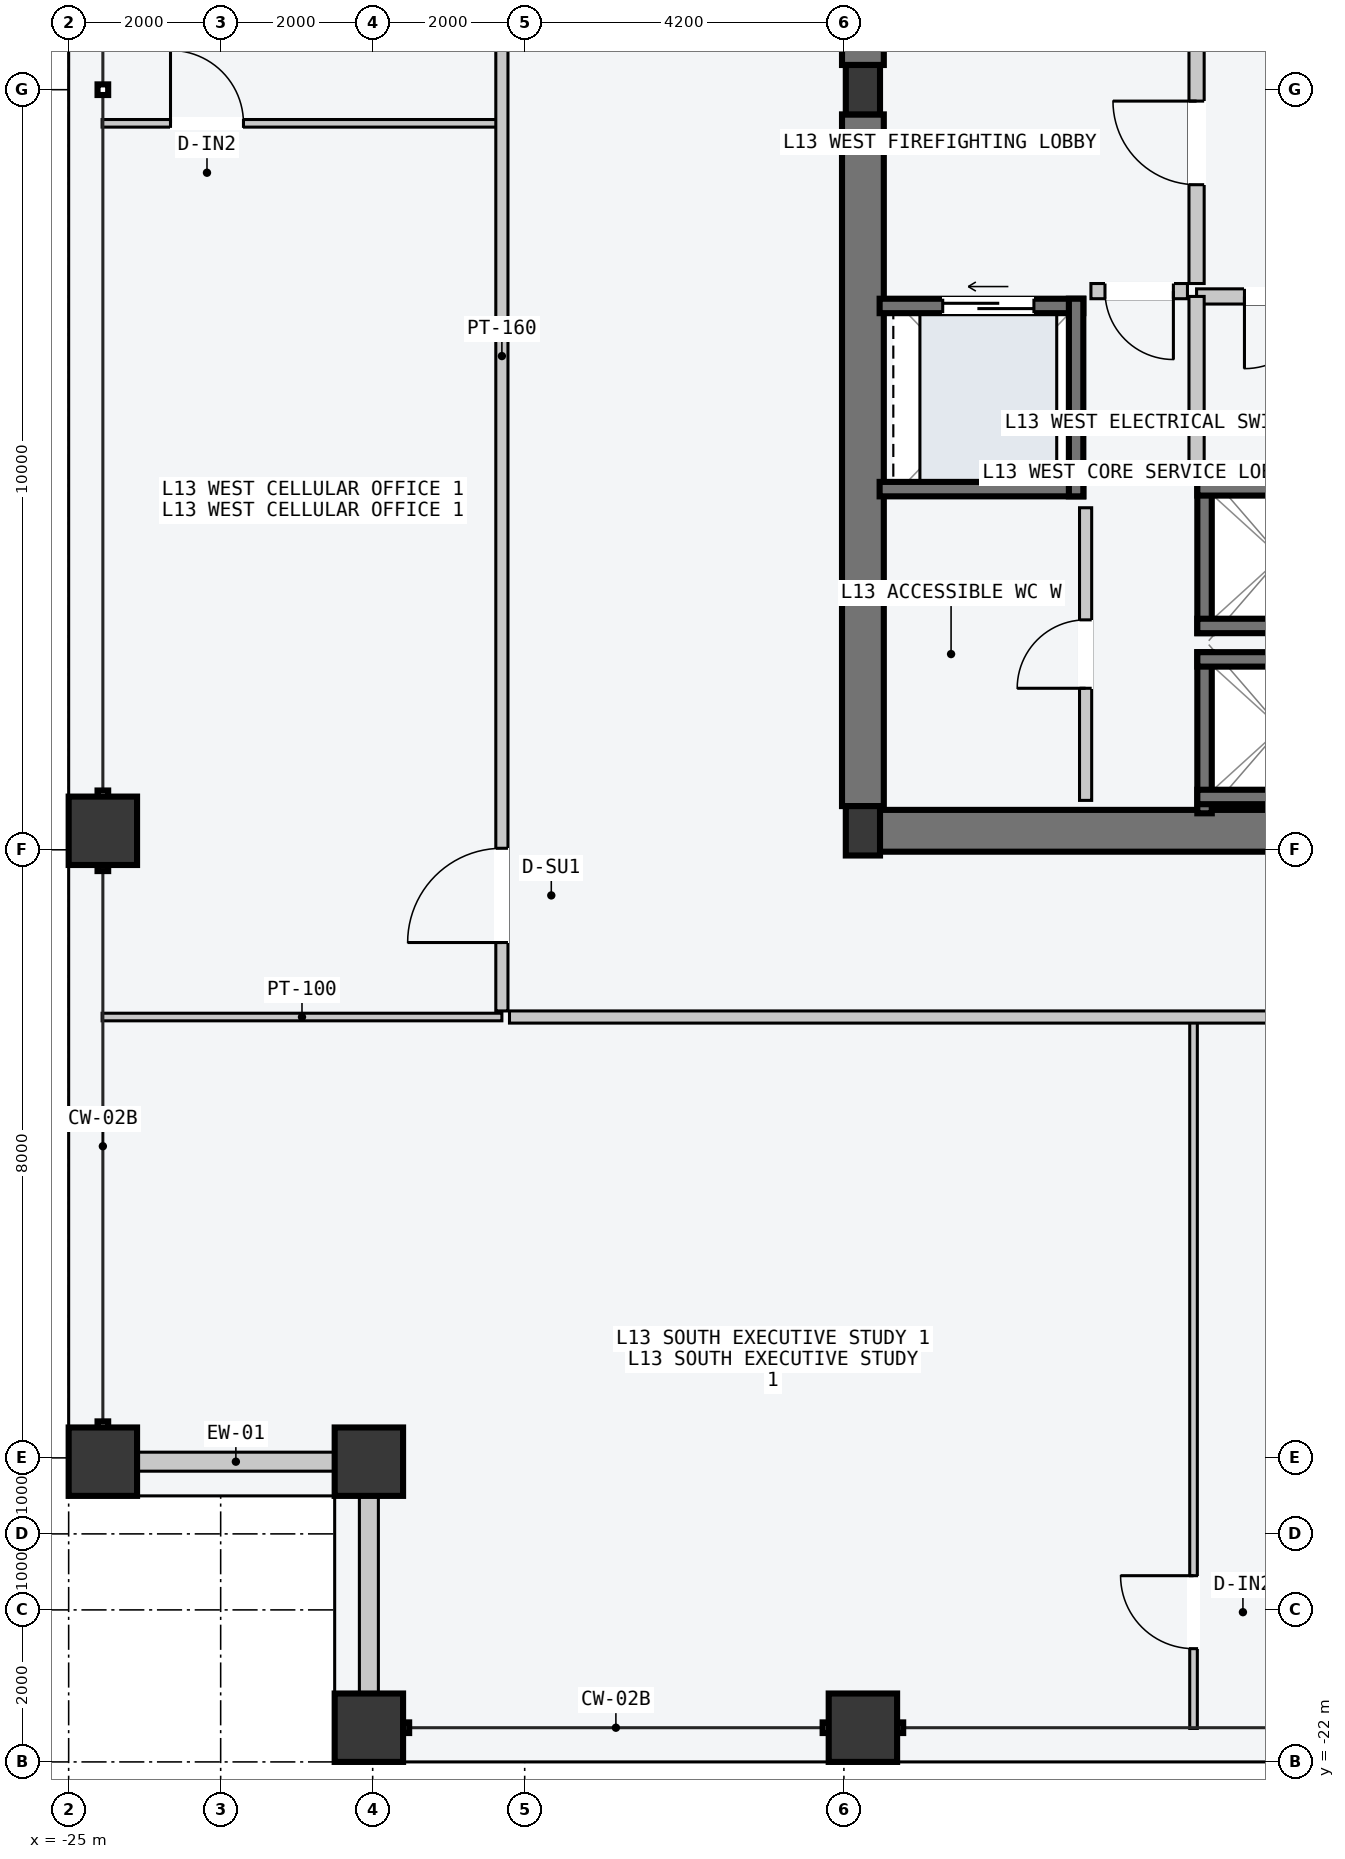
"""IFC4 building model, lengths in metres.
Left out: names, types, materials, properties, quantities, classifications, styles, units other than length and angle.
Written with IfcOpenShell. Run it as: python <this file> out.ifc"""

import sys

from ifc_helpers import new_model, si_unit, direction, frame, frame_2d, origin, origin_2d, place, context, subcontext, project, spatial, rectangle, hollow_rectangle, i_section, extrude, element, fill, save


model = new_model("IFC4")
c1 = context("Model", 3, precision=1e-05, world=origin(), true_north=direction((0.0, 1.0)))
c2 = subcontext(c1, "Body", "Model", "MODEL_VIEW")
j1 = project(units=[si_unit("LENGTHUNIT", "METRE"), si_unit("PLANEANGLEUNIT", "RADIAN")], contexts=[c1])
p1 = place(None, origin())
s1 = spatial("IfcSite", under=j1, at=p1, CompositionType="ELEMENT")
p2 = place(p1, origin())
s2 = spatial("IfcBuilding", under=s1, at=p2, CompositionType="ELEMENT")
p3 = place(p2, frame((0.0, 0.0, 52.8)))
s3 = spatial("IfcBuildingStorey", under=s2, at=p3, CompositionType="ELEMENT", Elevation=52.8)
p4 = place(p3, frame((-14.53, -9.75, -0.2), z_axis=(0.0, 0.0, 1.0), x_axis=(1.0, 0.0, 0.0)))
e1 = element("IfcWall", 1, at=p4, inside=s3, PredefinedType="SHEAR", context=c2, shape_type="SweptSolid", body=[
    extrude(rectangle(XDim=6.46, YDim=0.55, at=frame_2d((3.23, 0.0))), origin(), (0.0, 0.0, 1.0), 3.6),
])
for number, where, z_axis, x_axis in (
    (2, (-14.55, -9.425, -0.2), (0.0, 0.0, 1.0), (0.0, 1.0, 0.0)),
    (3, (-14.55, 0.325, -0.2), (0.0, 0.0, 1.0), (0.0, 1.0, 0.0)),
):
    element("IfcWall", number, at=place(p3, frame(where, z_axis=z_axis, x_axis=x_axis)), inside=s3, PredefinedType="SHEAR", context=c2, shape_type="SweptSolid", body=[
        extrude(rectangle(XDim=9.1, YDim=0.55, at=frame_2d((4.55, 0.0))), origin(), (0.0, 0.0, 1.0), 3.6),
    ])
for number, where, z_axis, x_axis in (
    (4, (-14.55, -9.75, 0.0), (0.0, 0.0, 1.0), (1.0, 0.0, 0.0)),
    (5, (-14.55, 0.0, 0.0), (0.0, 0.0, 1.0), (1.0, 0.0, 0.0)),
):
    element("IfcColumn", number, at=place(p3, frame(where, z_axis=z_axis, x_axis=x_axis)), inside=s3, PredefinedType="COLUMN", context=c2, shape_type="SweptSolid", body=[
        extrude(i_section(OverallWidth=0.45, OverallDepth=0.65, WebThickness=0.025, FlangeThickness=0.04, at=origin_2d()), origin(), (0.0, 0.0, 1.0), 3.6),
    ])
for number, where, z_axis, x_axis in (
    (6, (-21.05, -21.55, 0.0), (0.0, 0.0, 1.0), (1.0, 0.0, 0.0)),
    (7, (-14.55, -21.55, 0.0), (0.0, 0.0, 1.0), (1.0, 0.0, 0.0)),
    (8, (-24.55, -18.05, 0.0), (0.0, 0.0, 1.0), (0.0, 1.0, 0.0)),
    (9, (-24.55, -9.75, 0.0), (0.0, 0.0, 1.0), (0.0, 1.0, 0.0)),
    (10, (-21.05, -18.05, 0.0), (0.0, 0.0, 1.0), (1.0, 0.0, 0.0)),
):
    element("IfcColumn", number, at=place(p3, frame(where, z_axis=z_axis, x_axis=x_axis)), inside=s3, PredefinedType="COLUMN", context=c2, shape_type="SweptSolid", body=[
        extrude(hollow_rectangle(XDim=0.9, YDim=0.9, WallThickness=0.045, at=origin_2d()), origin(), (0.0, 0.0, 1.0), 3.6),
    ])
for number, where, z_axis, x_axis in (
    (11, (-24.09, -18.05, 0.0), (0.0, 0.0, 1.0), (1.0, 0.0, 0.0)),
    (12, (-21.05, -21.09, 0.0), (0.0, 0.0, 1.0), (0.0, 1.0, 0.0)),
):
    element("IfcWall", number, at=place(p3, frame(where, z_axis=z_axis, x_axis=x_axis)), inside=s3, PredefinedType="STANDARD", context=c2, shape_type="SweptSolid", body=[
        extrude(rectangle(XDim=2.58, YDim=0.25, at=frame_2d((1.29, 0.0))), origin(), (0.0, 0.0, 1.0), 1.74),
    ])
p5 = place(p3, frame((-10.055, -9.52, -0.2), z_axis=(0.0, 0.0, 1.0), x_axis=(0.0, 1.0, 0.0)))
e13 = element("IfcWall", 13, at=p5, inside=s3, PredefinedType="SOLIDWALL", context=c2, shape_type="SweptSolid", body=[
    extrude(rectangle(XDim=2.12, YDim=0.19, at=frame_2d((1.06, 0.0))), origin(), (0.0, 0.0, 1.0), 3.6),
])
for number, where, z_axis, x_axis in (
    (14, (-10.15, -7.495, -0.2), (0.0, 0.0, 1.0), (1.0, 0.0, 0.0)),
    (15, (-10.15, -9.305, -0.2), (0.0, 0.0, 1.0), (1.0, 0.0, 0.0)),
):
    element("IfcWall", number, at=place(p3, frame(where, z_axis=z_axis, x_axis=x_axis)), inside=s3, PredefinedType="SOLIDWALL", context=c2, shape_type="SweptSolid", body=[
        extrude(rectangle(XDim=2.2, YDim=0.19, at=frame_2d((1.1, 0.0))), origin(), (0.0, 0.0, 1.0), 3.6),
    ])
p6 = place(p3, frame((-10.055, -7.15, -0.2), z_axis=(0.0, 0.0, 1.0), x_axis=(0.0, 1.0, 0.0)))
e16 = element("IfcWall", 16, at=p6, inside=s3, PredefinedType="SOLIDWALL", context=c2, shape_type="SweptSolid", body=[
    extrude(rectangle(XDim=2.0, YDim=0.19, at=frame_2d((1.0, 0.0))), origin(), (0.0, 0.0, 1.0), 3.6),
])
for number, where, z_axis, x_axis in (
    (17, (-10.15, -5.245, -0.2), (0.0, 0.0, 1.0), (1.0, 0.0, 0.0)),
    (18, (-10.15, -7.055, -0.2), (0.0, 0.0, 1.0), (1.0, 0.0, 0.0)),
):
    element("IfcWall", number, at=place(p3, frame(where, z_axis=z_axis, x_axis=x_axis)), inside=s3, PredefinedType="SOLIDWALL", context=c2, shape_type="SweptSolid", body=[
        extrude(rectangle(XDim=2.2, YDim=0.19, at=frame_2d((1.1, 0.0))), origin(), (0.0, 0.0, 1.0), 3.6),
    ])
p7 = place(p3, frame((-14.33, -2.845, -0.2), z_axis=(0.0, 0.0, 1.0), x_axis=(1.0, 0.0, 0.0)))
e19 = element("IfcWall", 19, at=p7, inside=s3, PredefinedType="SOLIDWALL", context=c2, shape_type="SweptSolid", body=[
    extrude(rectangle(XDim=2.68, YDim=0.19, at=frame_2d((1.34, 0.0))), origin(), (0.0, 0.0, 1.0), 3.6),
])
p8 = place(p7, frame((0.83, 0.0, 0.2)))
e20 = element("IfcOpeningElement", 20, at=p8, cuts=e19, PredefinedType="OPENING", context=c2, shape_type="SweptSolid", body=[
    extrude(rectangle(XDim=1.2, YDim=2.2, at=frame_2d((0.6, 1.1))), frame((0.0, 0.105, 0.0), z_axis=(0.0, -1.0, 0.0), x_axis=(1.0, 0.0, 0.0)), (0.0, 0.0, 1.0), 0.21),
])
p9 = place(p3, frame((-14.33, -5.255, -0.2), z_axis=(0.0, 0.0, 1.0), x_axis=(1.0, 0.0, 0.0)))
e21 = element("IfcWall", 21, at=p9, inside=s3, PredefinedType="SOLIDWALL", context=c2, shape_type="SweptSolid", body=[
    extrude(rectangle(XDim=2.68, YDim=0.19, at=frame_2d((1.34, 0.0))), origin(), (0.0, 0.0, 1.0), 3.6),
])
p10 = place(p3, frame((-11.745, -5.35, -0.2), z_axis=(0.0, 0.0, 1.0), x_axis=(0.0, 1.0, 0.0)))
e22 = element("IfcWall", 22, at=p10, inside=s3, PredefinedType="SOLIDWALL", context=c2, shape_type="SweptSolid", body=[
    extrude(rectangle(XDim=2.6, YDim=0.19, at=frame_2d((1.3, 0.0))), origin(), (0.0, 0.0, 1.0), 3.6),
])
p11 = place(p3, frame((-10.16, -2.55, 0.0), z_axis=(0.0, 0.0, 1.0), x_axis=(0.0, 1.0, 0.0)))
e23 = element("IfcWall", 23, at=p11, inside=s3, PredefinedType="PARTITIONING", context=c2, shape_type="SweptSolid", body=[
    extrude(rectangle(XDim=3.4, YDim=0.2, at=frame_2d((1.7, 0.0))), origin(), (0.0, 0.0, 1.0), 3.4),
])
p12 = place(p11, frame((1.3, 0.0, 0.0)))
e24 = element("IfcOpeningElement", 24, at=p12, cuts=e23, PredefinedType="OPENING", context=c2, shape_type="SweptSolid", body=[
    extrude(rectangle(XDim=1.1, YDim=2.15, at=frame_2d((0.55, 1.075))), frame((0.0, 0.11, 0.0), z_axis=(0.0, -1.0, 0.0), x_axis=(1.0, 0.0, 0.0)), (0.0, 0.0, 1.0), 0.22),
])
p13 = place(p3, frame((-10.28, -2.65, 0.0), z_axis=(0.0, 0.0, 1.0), x_axis=(-1.0, 0.0, 0.0)))
e25 = element("IfcWall", 25, at=p13, inside=s3, PredefinedType="PARTITIONING", context=c2, shape_type="SweptSolid", body=[
    extrude(rectangle(XDim=1.27, YDim=0.2, at=frame_2d((0.635, 0.0))), origin(), (0.0, 0.0, 1.0), 3.4),
])
p14 = place(p13, frame((0.185, 0.0, 0.0)))
e26 = element("IfcOpeningElement", 26, at=p14, cuts=e25, PredefinedType="OPENING", context=c2, shape_type="SweptSolid", body=[
    extrude(rectangle(XDim=0.9, YDim=2.15, at=frame_2d((0.45, 1.075))), frame((0.0, 0.11, 0.0), z_axis=(0.0, -1.0, 0.0), x_axis=(1.0, 0.0, 0.0)), (0.0, 0.0, 1.0), 0.22),
])
p15 = place(p3, frame((-7.96, -2.72, 0.0), z_axis=(0.0, 0.0, 1.0), x_axis=(-1.0, 0.0, 0.0)))
e27 = element("IfcWall", 27, at=p15, inside=s3, PredefinedType="PARTITIONING", context=c2, shape_type="SweptSolid", body=[
    extrude(rectangle(XDim=2.2, YDim=0.2, at=frame_2d((1.1, 0.0))), origin(), (0.0, 0.0, 1.0), 3.4),
])
p16 = place(p15, frame((0.62, 0.0, 0.0)))
e28 = element("IfcOpeningElement", 28, at=p16, cuts=e27, PredefinedType="OPENING", context=c2, shape_type="SweptSolid", body=[
    extrude(rectangle(XDim=0.95, YDim=2.1, at=frame_2d((0.475, 1.05))), frame((0.0, 0.11, 0.0), z_axis=(0.0, -1.0, 0.0), x_axis=(1.0, 0.0, 0.0)), (0.0, 0.0, 1.0), 0.22),
])
p17 = place(p3, frame((-10.16, -5.16, 0.0), z_axis=(0.0, 0.0, 1.0), x_axis=(0.0, 1.0, 0.0)))
e29 = element("IfcWall", 29, at=p17, inside=s3, PredefinedType="PARTITIONING", context=c2, shape_type="SweptSolid", body=[
    extrude(rectangle(XDim=2.44, YDim=0.2, at=frame_2d((1.22, 0.0))), origin(), (0.0, 0.0, 1.0), 3.4),
])
p18 = place(p3, frame((-11.62, -9.35, 0.0), z_axis=(0.0, 0.0, 1.0), x_axis=(0.0, 1.0, 0.0)))
e30 = element("IfcWall", 30, at=p18, inside=s3, PredefinedType="PARTITIONING", context=c2, shape_type="SweptSolid", body=[
    extrude(rectangle(XDim=3.85, YDim=0.16, at=frame_2d((1.925, 0.0))), origin(), (0.0, 0.0, 1.0), 3.4),
])
p19 = place(p18, frame((1.475, 0.0, 0.0)))
e31 = element("IfcOpeningElement", 31, at=p19, cuts=e30, PredefinedType="OPENING", context=c2, shape_type="SweptSolid", body=[
    extrude(rectangle(XDim=0.9, YDim=2.15, at=frame_2d((0.45, 1.075))), frame((0.0, 0.09, 0.0), z_axis=(0.0, -1.0, 0.0), x_axis=(1.0, 0.0, 0.0)), (0.0, 0.0, 1.0), 0.18),
])
p20 = place(p3, frame((-10.2, -21.56, 0.0), z_axis=(0.0, 0.0, 1.0), x_axis=(0.0, 1.0, 0.0)))
e32 = element("IfcWall", 32, at=p20, inside=s3, PredefinedType="PARTITIONING", context=c2, shape_type="SweptSolid", body=[
    extrude(rectangle(XDim=9.3, YDim=0.1, at=frame_2d((4.65, 0.0))), origin(), (0.0, 0.0, 1.0), 3.4),
])
p21 = place(p20, frame((1.05, 0.0, 0.0)))
e33 = element("IfcOpeningElement", 33, at=p21, cuts=e32, PredefinedType="OPENING", context=c2, shape_type="SweptSolid", body=[
    extrude(rectangle(XDim=0.96, YDim=2.18, at=frame_2d((0.48, 1.09))), frame((0.0, 0.06, 0.0), z_axis=(0.0, -1.0, 0.0), x_axis=(1.0, 0.0, 0.0)), (0.0, 0.0, 1.0), 0.12),
])
p22 = place(p3, frame((-19.2, -12.2, 0.0), z_axis=(0.0, 0.0, 1.0), x_axis=(1.0, 0.0, 0.0)))
e34 = element("IfcWall", 34, at=p22, inside=s3, PredefinedType="PARTITIONING", context=c2, shape_type="SweptSolid", body=[
    extrude(rectangle(XDim=38.4, YDim=0.16, at=frame_2d((19.2, 0.0))), origin(), (0.0, 0.0, 1.0), 1.74),
])
p23 = place(p3, frame((-24.56, -12.2, 0.0), z_axis=(0.0, 0.0, 1.0), x_axis=(1.0, 0.0, 0.0)))
e35 = element("IfcWall", 35, at=p23, inside=s3, PredefinedType="PARTITIONING", context=c2, shape_type="SweptSolid", body=[
    extrude(rectangle(XDim=5.26, YDim=0.1, at=frame_2d((2.63, 0.0))), origin(), (0.0, 0.0, 1.0), 1.74),
])
p24 = place(p3, frame((-24.56, -0.442, 0.0), z_axis=(0.0, 0.0, 1.0), x_axis=(1.0, 0.0, 0.0)))
e36 = element("IfcWall", 36, at=p24, inside=s3, PredefinedType="PARTITIONING", context=c2, shape_type="SweptSolid", body=[
    extrude(rectangle(XDim=5.2, YDim=0.1, at=frame_2d((2.6, 0.0))), origin(), (0.0, 0.0, 1.0), 3.4),
])
p25 = place(p24, frame((0.9, 0.0, 0.0)))
e37 = element("IfcOpeningElement", 37, at=p25, cuts=e36, PredefinedType="OPENING", context=c2, shape_type="SweptSolid", body=[
    extrude(rectangle(XDim=0.96, YDim=2.18, at=frame_2d((0.48, 1.09))), frame((0.0, 0.06, 0.0), z_axis=(0.0, -1.0, 0.0), x_axis=(1.0, 0.0, 0.0)), (0.0, 0.0, 1.0), 0.12),
])
p26 = place(p3, frame((-19.3, -12.12, 0.0), z_axis=(0.0, 0.0, 1.0), x_axis=(0.0, 1.0, 0.0)))
e38 = element("IfcWall", 38, at=p26, inside=s3, PredefinedType="PARTITIONING", context=c2, shape_type="SweptSolid", body=[
    extrude(rectangle(XDim=26.54, YDim=0.16, at=frame_2d((13.27, 0.0))), origin(), (0.0, 0.0, 1.0), 3.4),
])
p27 = place(p26, frame((0.9, 0.0, 0.0)))
e39 = element("IfcOpeningElement", 39, at=p27, cuts=e38, PredefinedType="OPENING", context=c2, shape_type="SweptSolid", body=[
    extrude(rectangle(XDim=1.24, YDim=2.24, at=frame_2d((0.62, 1.12))), frame((0.0, 0.09, 0.0), z_axis=(0.0, -1.0, 0.0), x_axis=(1.0, 0.0, 0.0)), (0.0, 0.0, 1.0), 0.18),
])
p28 = place(p26, frame((15.091, 0.0, 0.0)))
e40 = element("IfcOpeningElement", 40, at=p28, cuts=e38, PredefinedType="OPENING", context=c2, shape_type="SweptSolid", body=[
    extrude(rectangle(XDim=1.4, YDim=2.2, at=frame_2d((0.7, 1.1))), frame((0.0, 0.09, 0.0), z_axis=(0.0, -1.0, 0.0), x_axis=(1.0, 0.0, 0.0)), (0.0, 0.0, 1.0), 0.18),
])
p29 = place(p26, frame((22.772, 0.0, 0.0)))
e41 = element("IfcOpeningElement", 41, at=p29, cuts=e38, PredefinedType="OPENING", context=c2, shape_type="SweptSolid", body=[
    extrude(rectangle(XDim=0.9, YDim=2.15, at=frame_2d((0.45, 1.075))), frame((0.0, 0.09, 0.0), z_axis=(0.0, -1.0, 0.0), x_axis=(1.0, 0.0, 0.0)), (0.0, 0.0, 1.0), 0.18),
])
p30 = place(p8, origin())
e42 = element("IfcDoor", 42, at=p30, inside=s3, OperationType="SLIDING_TO_LEFT", PredefinedType="DOOR", context=c2, shape_type="SweptSolid", body=[
    extrude(rectangle(XDim=1.2, YDim=2.2, at=frame_2d((0.6, 1.1))), frame((0.0, 0.025, 0.0), z_axis=(0.0, -1.0, 0.0), x_axis=(1.0, 0.0, 0.0)), (0.0, 0.0, 1.0), 0.05),
])
fill(e20, e42)
p31 = place(p12, origin())
e43 = element("IfcDoor", 43, at=p31, inside=s3, OperationType="SINGLE_SWING_RIGHT", PredefinedType="DOOR", context=c2, shape_type="SweptSolid", body=[
    extrude(rectangle(XDim=1.1, YDim=2.15, at=frame_2d((0.55, 1.075))), frame((0.0, 0.025, 0.0), z_axis=(0.0, -1.0, 0.0), x_axis=(1.0, 0.0, 0.0)), (0.0, 0.0, 1.0), 0.05),
])
fill(e24, e43)
p32 = place(p14, origin())
e44 = element("IfcDoor", 44, at=p32, inside=s3, OperationType="SINGLE_SWING_LEFT", PredefinedType="DOOR", context=c2, shape_type="SweptSolid", body=[
    extrude(rectangle(XDim=0.9, YDim=2.15, at=frame_2d((0.45, 1.075))), frame((0.0, 0.025, 0.0), z_axis=(0.0, -1.0, 0.0), x_axis=(1.0, 0.0, 0.0)), (0.0, 0.0, 1.0), 0.05),
])
fill(e26, e44)
p33 = place(p16, origin())
e45 = element("IfcDoor", 45, at=p33, inside=s3, OperationType="SINGLE_SWING_RIGHT", PredefinedType="DOOR", context=c2, shape_type="SweptSolid", body=[
    extrude(rectangle(XDim=0.95, YDim=2.1, at=frame_2d((0.475, 1.05))), frame((0.0, 0.025, 0.0), z_axis=(0.0, -1.0, 0.0), x_axis=(1.0, 0.0, 0.0)), (0.0, 0.0, 1.0), 0.05),
])
fill(e28, e45)
p34 = place(p19, origin())
e46 = element("IfcDoor", 46, at=p34, inside=s3, OperationType="SINGLE_SWING_LEFT", PredefinedType="DOOR", context=c2, shape_type="SweptSolid", body=[
    extrude(rectangle(XDim=0.9, YDim=2.15, at=frame_2d((0.45, 1.075))), frame((0.0, 0.025, 0.0), z_axis=(0.0, -1.0, 0.0), x_axis=(1.0, 0.0, 0.0)), (0.0, 0.0, 1.0), 0.05),
])
fill(e31, e46)
p35 = place(p21, origin())
e47 = element("IfcDoor", 47, at=p35, inside=s3, OperationType="SINGLE_SWING_RIGHT", PredefinedType="DOOR", context=c2, shape_type="SweptSolid", body=[
    extrude(rectangle(XDim=0.96, YDim=2.18, at=frame_2d((0.48, 1.09))), frame((0.0, 0.025, 0.0), z_axis=(0.0, -1.0, 0.0), x_axis=(1.0, 0.0, 0.0)), (0.0, 0.0, 1.0), 0.05),
])
fill(e33, e47)
p36 = place(p25, origin())
e48 = element("IfcDoor", 48, at=p36, inside=s3, OperationType="SINGLE_SWING_LEFT", PredefinedType="DOOR", context=c2, shape_type="SweptSolid", body=[
    extrude(rectangle(XDim=0.96, YDim=2.18, at=frame_2d((0.48, 1.09))), frame((0.0, 0.025, 0.0), z_axis=(0.0, -1.0, 0.0), x_axis=(1.0, 0.0, 0.0)), (0.0, 0.0, 1.0), 0.05),
])
fill(e37, e48)
p37 = place(p27, origin())
e49 = element("IfcDoor", 49, at=p37, inside=s3, OperationType="SINGLE_SWING_LEFT", PredefinedType="DOOR", context=c2, shape_type="SweptSolid", body=[
    extrude(rectangle(XDim=1.24, YDim=2.24, at=frame_2d((0.62, 1.12))), frame((0.0, 0.025, 0.0), z_axis=(0.0, -1.0, 0.0), x_axis=(1.0, 0.0, 0.0)), (0.0, 0.0, 1.0), 0.05),
])
fill(e39, e49)
save(model, sys.argv[1])
